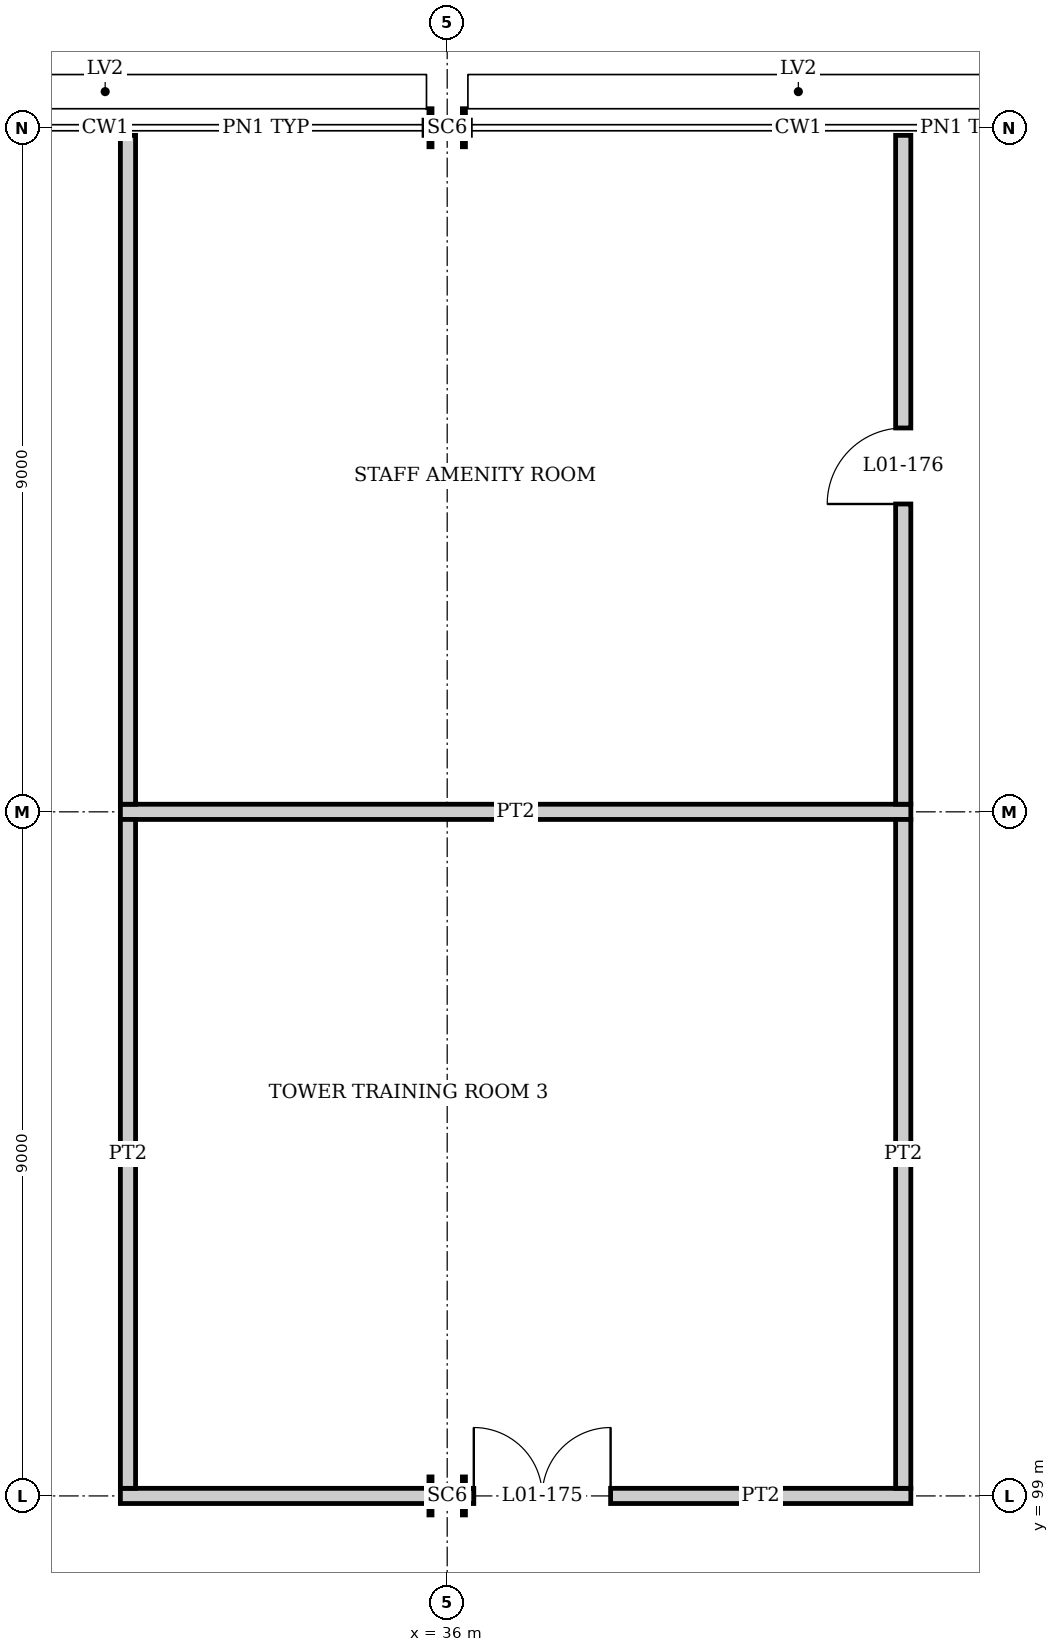
"""IFC4 building model, lengths in metres.
Left out: names, types, materials, properties, quantities, classifications, styles, units other than length and angle.
Written with IfcOpenShell. Run it as: python <this file> out.ifc"""

import sys

from ifc_helpers import new_model, si_unit, direction, frame, frame_2d, origin, origin_2d, place, context, subcontext, project, spatial, rectangle, i_section, extrude, element, fill, save


model = new_model("IFC4")
c1 = context("Model", 3, precision=1e-05, world=origin(), true_north=direction((0.0, 1.0)))
c2 = subcontext(c1, "Body", "Model", "MODEL_VIEW")
j1 = project(units=[si_unit("LENGTHUNIT", "METRE"), si_unit("PLANEANGLEUNIT", "RADIAN")], contexts=[c1])
p1 = place(None, origin())
s1 = spatial("IfcSite", under=j1, at=p1, CompositionType="ELEMENT")
p2 = place(p1, origin())
s2 = spatial("IfcBuilding", under=s1, at=p2, CompositionType="ELEMENT")
p3 = place(p2, frame((0.0, 0.0, 6.0)))
s3 = spatial("IfcBuildingStorey", under=s2, at=p3, CompositionType="ELEMENT", Elevation=6.0)
for number, where, z_axis, x_axis in (
    (1, (36.0, 99.0, 0.0), (0.0, 0.0, 1.0), (0.0, 1.0, 0.0)),
    (2, (36.0, 117.0, 0.0), (0.0, 0.0, 1.0), (0.0, 1.0, 0.0)),
):
    element("IfcColumn", number, at=place(p3, frame(where, z_axis=z_axis, x_axis=x_axis)), inside=s3, PredefinedType="COLUMN", context=c2, shape_type="SweptSolid", body=[
        extrude(i_section(OverallWidth=0.5, OverallDepth=0.48, WebThickness=0.04, FlangeThickness=0.04, at=origin_2d()), origin(), (0.0, 0.0, 1.0), 4.5),
    ])
p4 = place(p3, frame((31.7, 99.0, 0.0), z_axis=(0.0, 0.0, 1.0), x_axis=(1.0, 0.0, 0.0)))
e3 = element("IfcWall", 3, at=p4, inside=s3, PredefinedType="PARTITIONING", context=c2, shape_type="SweptSolid", body=[
    extrude(rectangle(XDim=4.05, YDim=0.2, at=frame_2d((2.025, 0.0))), origin(), (0.0, 0.0, 1.0), 3.64),
])
p5 = place(p3, frame((36.25, 99.0, 0.0), z_axis=(0.0, 0.0, 1.0), x_axis=(1.0, 0.0, 0.0)))
e4 = element("IfcWall", 4, at=p5, inside=s3, PredefinedType="PARTITIONING", context=c2, shape_type="SweptSolid", body=[
    extrude(rectangle(XDim=5.85, YDim=0.2, at=frame_2d((2.925, 0.0))), origin(), (0.0, 0.0, 1.0), 3.64),
])
p6 = place(p5, frame((0.1, 0.0, 0.0)))
e5 = element("IfcOpeningElement", 5, at=p6, cuts=e4, PredefinedType="OPENING", context=c2, shape_type="SweptSolid", body=[
    extrude(rectangle(XDim=1.8, YDim=2.1, at=frame_2d((0.9, 1.05))), frame((0.0, 0.11, 0.0), z_axis=(0.0, -1.0, 0.0), x_axis=(1.0, 0.0, 0.0)), (0.0, 0.0, 1.0), 0.22),
])
p7 = place(p3, frame((31.7, 108.0, 0.0), z_axis=(0.0, 0.0, 1.0), x_axis=(1.0, 0.0, 0.0)))
e6 = element("IfcWall", 6, at=p7, inside=s3, PredefinedType="PARTITIONING", context=c2, shape_type="SweptSolid", body=[
    extrude(rectangle(XDim=10.4, YDim=0.2, at=frame_2d((5.2, 0.0))), origin(), (0.0, 0.0, 1.0), 3.55),
])
p8 = place(p3, frame((31.8, 99.1, 0.0), z_axis=(0.0, 0.0, 1.0), x_axis=(0.0, 1.0, 0.0)))
e7 = element("IfcWall", 7, at=p8, inside=s3, PredefinedType="PARTITIONING", context=c2, shape_type="SweptSolid", body=[
    extrude(rectangle(XDim=8.8, YDim=0.2, at=frame_2d((4.4, 0.0))), origin(), (0.0, 0.0, 1.0), 3.64),
])
p9 = place(p3, frame((31.8, 108.1, 0.0), z_axis=(0.0, 0.0, 1.0), x_axis=(0.0, 1.0, 0.0)))
e8 = element("IfcWall", 8, at=p9, inside=s3, PredefinedType="PARTITIONING", context=c2, shape_type="SweptSolid", body=[
    extrude(rectangle(XDim=8.8, YDim=0.2, at=frame_2d((4.4, 0.0))), origin(), (0.0, 0.0, 1.0), 4.35),
])
p10 = place(p3, frame((42.0, 99.1, 0.0), z_axis=(0.0, 0.0, 1.0), x_axis=(0.0, 1.0, 0.0)))
e9 = element("IfcWall", 9, at=p10, inside=s3, PredefinedType="PARTITIONING", context=c2, shape_type="SweptSolid", body=[
    extrude(rectangle(XDim=8.8, YDim=0.2, at=frame_2d((4.4, 0.0))), origin(), (0.0, 0.0, 1.0), 3.64),
])
p11 = place(p3, frame((42.0, 108.1, 0.0), z_axis=(0.0, 0.0, 1.0), x_axis=(0.0, 1.0, 0.0)))
e10 = element("IfcWall", 10, at=p11, inside=s3, PredefinedType="PARTITIONING", context=c2, shape_type="SweptSolid", body=[
    extrude(rectangle(XDim=8.8, YDim=0.2, at=frame_2d((4.4, 0.0))), origin(), (0.0, 0.0, 1.0), 4.35),
])
p12 = place(p11, frame((3.95, 0.0, 0.0)))
e11 = element("IfcOpeningElement", 11, at=p12, cuts=e10, PredefinedType="OPENING", context=c2, shape_type="SweptSolid", body=[
    extrude(rectangle(XDim=1.0, YDim=2.1, at=frame_2d((0.5, 1.05))), frame((0.0, 0.11, 0.0), z_axis=(0.0, -1.0, 0.0), x_axis=(1.0, 0.0, 0.0)), (0.0, 0.0, 1.0), 0.22),
])
p13 = place(p6, origin())
e12 = element("IfcDoor", 12, at=p13, inside=s3, OperationType="DOUBLE_DOOR_SINGLE_SWING", PredefinedType="DOOR", context=c2, shape_type="SweptSolid", body=[
    extrude(rectangle(XDim=1.8, YDim=2.1, at=frame_2d((0.9, 1.05))), frame((0.0, 0.025, 0.0), z_axis=(0.0, -1.0, 0.0), x_axis=(1.0, 0.0, 0.0)), (0.0, 0.0, 1.0), 0.05),
])
fill(e5, e12)
p14 = place(p12, origin())
e13 = element("IfcDoor", 13, at=p14, inside=s3, OperationType="SINGLE_SWING_LEFT", PredefinedType="DOOR", context=c2, shape_type="SweptSolid", body=[
    extrude(rectangle(XDim=1.0, YDim=2.1, at=frame_2d((0.5, 1.05))), frame((0.0, 0.025, 0.0), z_axis=(0.0, -1.0, 0.0), x_axis=(1.0, 0.0, 0.0)), (0.0, 0.0, 1.0), 0.05),
])
fill(e11, e13)
save(model, sys.argv[1])
